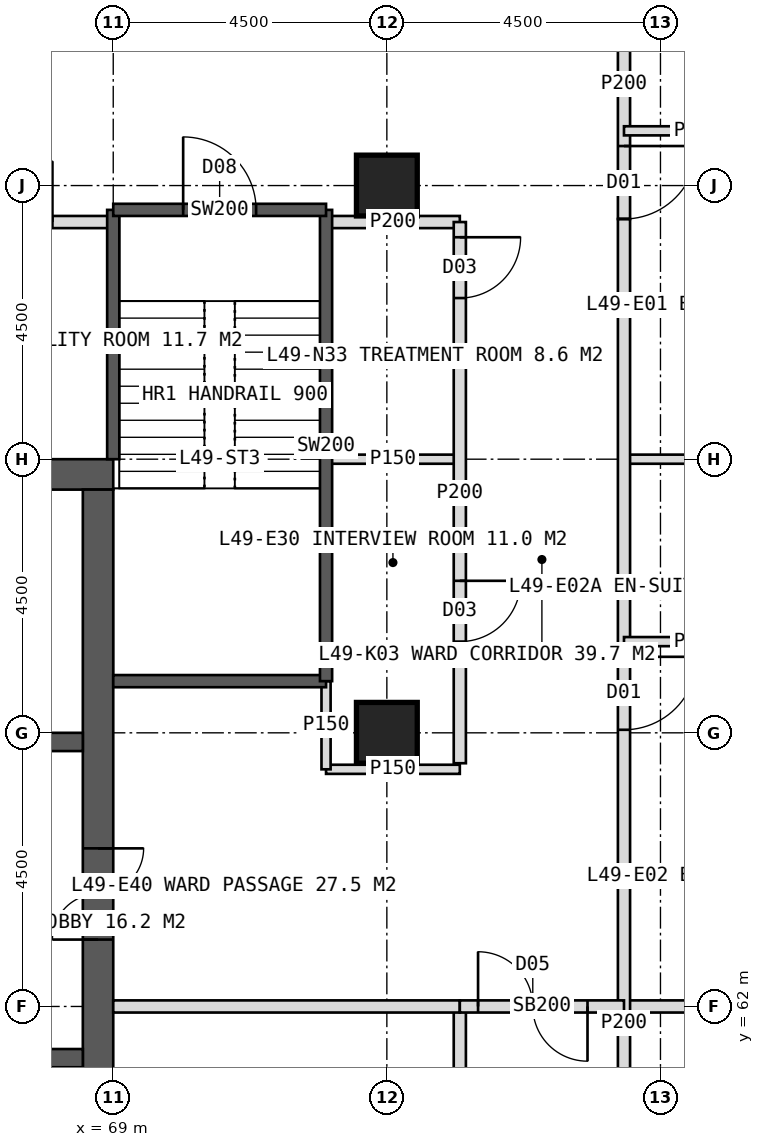
"""IFC4 building model, lengths in metres.
Left out: names, types, materials, properties, quantities, classifications, styles, units other than length and angle.
Written with IfcOpenShell. Run it as: python <this file> out.ifc"""

import sys

from ifc_helpers import new_model, si_unit, direction, frame, frame_2d, origin, origin_2d, place, context, subcontext, project, spatial, rectangle, hollow_rectangle, extrude, element, fill, save


model = new_model("IFC4")
c1 = context("Model", 3, precision=1e-05, world=origin(), true_north=direction((0.0, 1.0)))
c2 = subcontext(c1, "Body", "Model", "MODEL_VIEW")
j1 = project(units=[si_unit("LENGTHUNIT", "METRE"), si_unit("PLANEANGLEUNIT", "RADIAN")], contexts=[c1])
p1 = place(None, origin())
s1 = spatial("IfcSite", under=j1, at=p1, CompositionType="ELEMENT")
p2 = place(p1, origin())
s2 = spatial("IfcBuilding", under=s1, at=p2, CompositionType="ELEMENT")
p3 = place(p2, frame((0.0, 0.0, 205.0)))
s3 = spatial("IfcBuildingStorey", under=s2, at=p3, CompositionType="ELEMENT", Elevation=205.0)
p4 = place(p3, frame((51.0, 70.75, 0.0), z_axis=(0.0, 0.0, 1.0), x_axis=(1.0, 0.0, 0.0)))
e1 = element("IfcWall", 1, at=p4, inside=s3, PredefinedType="SHEAR", context=c2, shape_type="SweptSolid", body=[
    extrude(rectangle(XDim=18.0, YDim=0.5, at=frame_2d((9.0, 0.0))), origin(), (0.0, 0.0, 1.0), 4.0),
])
p5 = place(p4, frame((8.1, 0.0, 0.0)))
e2 = element("IfcOpeningElement", 2, at=p5, cuts=e1, PredefinedType="OPENING", context=c2, shape_type="SweptSolid", body=[
    extrude(rectangle(XDim=1.8, YDim=2.2, at=frame_2d((0.9, 1.1))), frame((0.0, 0.26, 0.0), z_axis=(0.0, -1.0, 0.0), x_axis=(1.0, 0.0, 0.0)), (0.0, 0.0, 1.0), 0.52),
])
p6 = place(p3, frame((68.75, 53.5, 0.0), z_axis=(0.0, 0.0, 1.0), x_axis=(0.0, 1.0, 0.0)))
e3 = element("IfcWall", 3, at=p6, inside=s3, PredefinedType="SHEAR", context=c2, shape_type="SweptSolid", body=[
    extrude(rectangle(XDim=17.0, YDim=0.5, at=frame_2d((8.5, 0.0))), origin(), (0.0, 0.0, 1.0), 4.0),
])
p7 = place(p6, frame((9.6, 0.0, 0.0)))
e4 = element("IfcOpeningElement", 4, at=p7, cuts=e3, PredefinedType="OPENING", context=c2, shape_type="SweptSolid", body=[
    extrude(rectangle(XDim=1.5, YDim=2.2, at=frame_2d((0.75, 1.1))), frame((0.0, 0.26, 0.0), z_axis=(0.0, -1.0, 0.0), x_axis=(1.0, 0.0, 0.0)), (0.0, 0.0, 1.0), 0.52),
])
p8 = place(p3, frame((65.2, 61.15, 0.0), z_axis=(0.0, 0.0, 1.0), x_axis=(1.0, 0.0, 0.0)))
e5 = element("IfcWall", 5, at=p8, inside=s3, PredefinedType="SHEAR", context=c2, shape_type="SweptSolid", body=[
    extrude(rectangle(XDim=3.3, YDim=0.3, at=frame_2d((1.65, 0.0))), origin(), (0.0, 0.0, 1.0), 4.0),
])
p9 = place(p8, frame((1.05, 0.0, 0.0)))
e6 = element("IfcOpeningElement", 6, at=p9, cuts=e5, PredefinedType="OPENING", context=c2, shape_type="SweptSolid", body=[
    extrude(rectangle(XDim=1.2, YDim=2.1, at=frame_2d((0.6, 1.05))), frame((0.0, 0.16, 0.0), z_axis=(0.0, -1.0, 0.0), x_axis=(1.0, 0.0, 0.0)), (0.0, 0.0, 1.0), 0.32),
])
p10 = place(p3, frame((65.2, 66.35, 0.0), z_axis=(0.0, 0.0, 1.0), x_axis=(1.0, 0.0, 0.0)))
e7 = element("IfcWall", 7, at=p10, inside=s3, PredefinedType="SHEAR", context=c2, shape_type="SweptSolid", body=[
    extrude(rectangle(XDim=3.3, YDim=0.3, at=frame_2d((1.65, 0.0))), origin(), (0.0, 0.0, 1.0), 4.0),
])
p11 = place(p10, frame((1.05, 0.0, 0.0)))
e8 = element("IfcOpeningElement", 8, at=p11, cuts=e7, PredefinedType="OPENING", context=c2, shape_type="SweptSolid", body=[
    extrude(rectangle(XDim=1.2, YDim=2.2, at=frame_2d((0.6, 1.1))), frame((0.0, 0.16, 0.0), z_axis=(0.0, -1.0, 0.0), x_axis=(1.0, 0.0, 0.0)), (0.0, 0.0, 1.0), 0.32),
])
for number, where, z_axis, x_axis in (
    (9, (73.5, 75.5, 0.0), (0.0, 0.0, 1.0), (1.0, 0.0, 0.0)),
    (10, (73.5, 66.5, 0.0), (0.0, 0.0, 1.0), (1.0, 0.0, 0.0)),
):
    element("IfcColumn", number, at=place(p3, frame(where, z_axis=z_axis, x_axis=x_axis)), inside=s3, PredefinedType="COLUMN", context=c2, shape_type="SweptSolid", body=[
        extrude(hollow_rectangle(XDim=1.0, YDim=1.0, WallThickness=0.1, at=origin_2d()), origin(), (0.0, 0.0, 1.0), 4.0),
    ])
p12 = place(p3, frame((62.25, 74.9, 0.0), z_axis=(0.0, 0.0, 1.0), x_axis=(1.0, 0.0, 0.0)))
e11 = element("IfcWall", 11, at=p12, inside=s3, PredefinedType="PARTITIONING", context=c2, shape_type="SweptSolid", body=[
    extrude(rectangle(XDim=6.75, YDim=0.2, at=frame_2d((3.375, 0.0))), origin(), (0.0, 0.0, 1.0), 3.75),
])
p13 = place(p12, frame((0.325, 0.0, 0.0)))
e12 = element("IfcOpeningElement", 12, at=p13, cuts=e11, PredefinedType="OPENING", context=c2, shape_type="SweptSolid", body=[
    extrude(rectangle(XDim=1.0, YDim=2.1, at=frame_2d((0.5, 1.05))), frame((0.0, 0.11, 0.0), z_axis=(0.0, -1.0, 0.0), x_axis=(1.0, 0.0, 0.0)), (0.0, 0.0, 1.0), 0.22),
])
p14 = place(p12, frame((4.75, 0.0, 0.0)))
e13 = element("IfcOpeningElement", 13, at=p14, cuts=e11, PredefinedType="OPENING", context=c2, shape_type="SweptSolid", body=[
    extrude(rectangle(XDim=1.0, YDim=2.1, at=frame_2d((0.5, 1.05))), frame((0.0, 0.11, 0.0), z_axis=(0.0, -1.0, 0.0), x_axis=(1.0, 0.0, 0.0)), (0.0, 0.0, 1.0), 0.22),
])
p15 = place(p3, frame((72.5, 74.9, 0.0), z_axis=(0.0, 0.0, 1.0), x_axis=(1.0, 0.0, 0.0)))
e14 = element("IfcWall", 14, at=p15, inside=s3, PredefinedType="PARTITIONING", context=c2, shape_type="SweptSolid", body=[
    extrude(rectangle(XDim=2.2, YDim=0.2, at=frame_2d((1.1, 0.0))), origin(), (0.0, 0.0, 1.0), 3.75),
])
p16 = place(p3, frame((77.4, 71.0, 0.0), z_axis=(0.0, 0.0, 1.0), x_axis=(1.0, 0.0, 0.0)))
e15 = element("IfcWall", 15, at=p16, inside=s3, PredefinedType="PARTITIONING", context=c2, shape_type="SweptSolid", body=[
    extrude(rectangle(XDim=4.95, YDim=0.15, at=frame_2d((2.475, 0.0))), origin(), (0.0, 0.0, 1.0), 3.75),
])
p17 = place(p3, frame((77.4, 62.0, 0.0), z_axis=(0.0, 0.0, 1.0), x_axis=(1.0, 0.0, 0.0)))
e16 = element("IfcWall", 16, at=p17, inside=s3, PredefinedType="SOLIDWALL", context=c2, shape_type="SweptSolid", body=[
    extrude(rectangle(XDim=4.95, YDim=0.2, at=frame_2d((2.475, 0.0))), origin(), (0.0, 0.0, 1.0), 2.95),
])
p18 = place(p3, frame((77.4, 79.4, 0.0), z_axis=(0.0, 0.0, 1.0), x_axis=(0.0, -1.0, 0.0)))
e17 = element("IfcWall", 17, at=p18, inside=s3, PredefinedType="PARTITIONING", context=c2, shape_type="SweptSolid", body=[
    extrude(rectangle(XDim=4.45, YDim=0.2, at=frame_2d((2.225, 0.0))), origin(), (0.0, 0.0, 1.0), 2.85),
])
p19 = place(p18, frame((3.25, 0.0, 0.0)))
e18 = element("IfcOpeningElement", 18, at=p19, cuts=e17, PredefinedType="OPENING", context=c2, shape_type="SweptSolid", body=[
    extrude(rectangle(XDim=1.2, YDim=2.2, at=frame_2d((0.6, 1.1))), frame((0.0, 0.11, 0.0), z_axis=(0.0, -1.0, 0.0), x_axis=(1.0, 0.0, 0.0)), (0.0, 0.0, 1.0), 0.22),
])
p20 = place(p3, frame((77.4, 74.95, 0.0), z_axis=(0.0, 0.0, 1.0), x_axis=(0.0, -1.0, 0.0)))
e19 = element("IfcWall", 19, at=p20, inside=s3, PredefinedType="PARTITIONING", context=c2, shape_type="SweptSolid", body=[
    extrude(rectangle(XDim=26.45, YDim=0.2, at=frame_2d((13.225, 0.0))), origin(), (0.0, 0.0, 1.0), 3.75),
])
p21 = place(p20, frame((7.2, 0.0, 0.0)))
e20 = element("IfcOpeningElement", 20, at=p21, cuts=e19, PredefinedType="OPENING", context=c2, shape_type="SweptSolid", body=[
    extrude(rectangle(XDim=1.2, YDim=2.2, at=frame_2d((0.6, 1.1))), frame((0.0, 0.11, 0.0), z_axis=(0.0, -1.0, 0.0), x_axis=(1.0, 0.0, 0.0)), (0.0, 0.0, 1.0), 0.22),
])
p22 = place(p20, frame((16.2, 0.0, 0.0)))
e21 = element("IfcOpeningElement", 21, at=p22, cuts=e19, PredefinedType="OPENING", context=c2, shape_type="SweptSolid", body=[
    extrude(rectangle(XDim=1.2, YDim=2.2, at=frame_2d((0.6, 1.1))), frame((0.0, 0.11, 0.0), z_axis=(0.0, -1.0, 0.0), x_axis=(1.0, 0.0, 0.0)), (0.0, 0.0, 1.0), 0.22),
])
p23 = place(p20, frame((25.2, 0.0, 0.0)))
e22 = element("IfcOpeningElement", 22, at=p23, cuts=e19, PredefinedType="OPENING", context=c2, shape_type="SweptSolid", body=[
    extrude(rectangle(XDim=1.2, YDim=2.2, at=frame_2d((0.6, 1.1))), frame((0.0, 0.11, 0.0), z_axis=(0.0, -1.0, 0.0), x_axis=(1.0, 0.0, 0.0)), (0.0, 0.0, 1.0), 0.22),
])
for number, where, z_axis, x_axis in (
    (23, (77.4, 76.4, 0.0), (0.0, 0.0, 1.0), (1.0, 0.0, 0.0)),
    (24, (77.4, 68.0, 0.0), (0.0, 0.0, 1.0), (1.0, 0.0, 0.0)),
):
    element("IfcWall", number, at=place(p3, frame(where, z_axis=z_axis, x_axis=x_axis)), inside=s3, PredefinedType="PARTITIONING", context=c2, shape_type="SweptSolid", body=[
        extrude(rectangle(XDim=2.4, YDim=0.15, at=frame_2d((1.2, 0.0))), origin(), (0.0, 0.0, 1.0), 3.75),
    ])
p24 = place(p3, frame((72.5, 71.0, 0.0), z_axis=(0.0, 0.0, 1.0), x_axis=(1.0, 0.0, 0.0)))
e25 = element("IfcWall", 25, at=p24, inside=s3, PredefinedType="PARTITIONING", context=c2, shape_type="SweptSolid", body=[
    extrude(rectangle(XDim=2.2, YDim=0.15, at=frame_2d((1.1, 0.0))), origin(), (0.0, 0.0, 1.0), 3.75),
])
p25 = place(p3, frame((74.7, 74.9, 0.0), z_axis=(0.0, 0.0, 1.0), x_axis=(0.0, -1.0, 0.0)))
e26 = element("IfcWall", 26, at=p25, inside=s3, PredefinedType="PARTITIONING", context=c2, shape_type="SweptSolid", body=[
    extrude(rectangle(XDim=8.9, YDim=0.2, at=frame_2d((4.45, 0.0))), origin(), (0.0, 0.0, 1.0), 3.75),
])
p26 = place(p25, frame((0.25, 0.0, 0.0)))
e27 = element("IfcOpeningElement", 27, at=p26, cuts=e26, PredefinedType="OPENING", context=c2, shape_type="SweptSolid", body=[
    extrude(rectangle(XDim=1.0, YDim=2.1, at=frame_2d((0.5, 1.05))), frame((0.0, 0.11, 0.0), z_axis=(0.0, -1.0, 0.0), x_axis=(1.0, 0.0, 0.0)), (0.0, 0.0, 1.0), 0.22),
])
p27 = place(p25, frame((5.9, 0.0, 0.0)))
e28 = element("IfcOpeningElement", 28, at=p27, cuts=e26, PredefinedType="OPENING", context=c2, shape_type="SweptSolid", body=[
    extrude(rectangle(XDim=1.0, YDim=2.1, at=frame_2d((0.5, 1.05))), frame((0.0, 0.11, 0.0), z_axis=(0.0, -1.0, 0.0), x_axis=(1.0, 0.0, 0.0)), (0.0, 0.0, 1.0), 0.22),
])
p28 = place(p3, frame((74.7, 62.0, 0.0), z_axis=(0.0, 0.0, 1.0), x_axis=(0.0, -1.0, 0.0)))
e29 = element("IfcWall", 29, at=p28, inside=s3, PredefinedType="PARTITIONING", context=c2, shape_type="SweptSolid", body=[
    extrude(rectangle(XDim=14.7, YDim=0.2, at=frame_2d((7.35, 0.0))), origin(), (0.0, 0.0, 1.0), 3.75),
])
p29 = place(p28, frame((1.45, 0.0, 0.0)))
e30 = element("IfcOpeningElement", 30, at=p29, cuts=e29, PredefinedType="OPENING", context=c2, shape_type="SweptSolid", body=[
    extrude(rectangle(XDim=1.0, YDim=2.1, at=frame_2d((0.5, 1.05))), frame((0.0, 0.11, 0.0), z_axis=(0.0, -1.0, 0.0), x_axis=(1.0, 0.0, 0.0)), (0.0, 0.0, 1.0), 0.22),
])
p30 = place(p28, frame((11.35, 0.0, 0.0)))
e31 = element("IfcOpeningElement", 31, at=p30, cuts=e29, PredefinedType="OPENING", context=c2, shape_type="SweptSolid", body=[
    extrude(rectangle(XDim=1.0, YDim=2.1, at=frame_2d((0.5, 1.05))), frame((0.0, 0.11, 0.0), z_axis=(0.0, -1.0, 0.0), x_axis=(1.0, 0.0, 0.0)), (0.0, 0.0, 1.0), 0.22),
])
p31 = place(p3, frame((72.5, 65.9, 0.0), z_axis=(0.0, 0.0, 1.0), x_axis=(1.0, 0.0, 0.0)))
e32 = element("IfcWall", 32, at=p31, inside=s3, PredefinedType="PARTITIONING", context=c2, shape_type="SweptSolid", body=[
    extrude(rectangle(XDim=2.2, YDim=0.15, at=frame_2d((1.1, 0.0))), origin(), (0.0, 0.0, 1.0), 3.75),
])
p32 = place(p3, frame((69.0, 62.0, 0.0), z_axis=(0.0, 0.0, 1.0), x_axis=(1.0, 0.0, 0.0)))
e33 = element("IfcWall", 33, at=p32, inside=s3, PredefinedType="SOLIDWALL", context=c2, shape_type="SweptSolid", body=[
    extrude(rectangle(XDim=5.7, YDim=0.2, at=frame_2d((2.85, 0.0))), origin(), (0.0, 0.0, 1.0), 2.95),
])
p33 = place(p3, frame((74.7, 62.0, 0.0), z_axis=(0.0, 0.0, 1.0), x_axis=(1.0, 0.0, 0.0)))
e34 = element("IfcWall", 34, at=p33, inside=s3, PredefinedType="SOLIDWALL", context=c2, shape_type="SweptSolid", body=[
    extrude(rectangle(XDim=2.7, YDim=0.2, at=frame_2d((1.35, 0.0))), origin(), (0.0, 0.0, 1.0), 2.95),
])
p34 = place(p33, frame((0.3, 0.0, 0.0)))
e35 = element("IfcOpeningElement", 35, at=p34, cuts=e34, PredefinedType="OPENING", context=c2, shape_type="SweptSolid", body=[
    extrude(rectangle(XDim=1.8, YDim=2.2, at=frame_2d((0.9, 1.1))), frame((0.0, 0.11, 0.0), z_axis=(0.0, -1.0, 0.0), x_axis=(1.0, 0.0, 0.0)), (0.0, 0.0, 1.0), 0.22),
])
p35 = place(p3, frame((72.5, 65.9, 0.0), z_axis=(0.0, 0.0, 1.0), x_axis=(0.0, 1.0, 0.0)))
e36 = element("IfcWall", 36, at=p35, inside=s3, PredefinedType="PARTITIONING", context=c2, shape_type="SweptSolid", body=[
    extrude(rectangle(XDim=1.45, YDim=0.15, at=frame_2d((0.725, 0.0))), origin(), (0.0, 0.0, 1.0), 3.75),
])
p36 = place(p3, frame((69.0, 71.0, 0.0), z_axis=(0.0, 0.0, 1.0), x_axis=(0.0, 1.0, 0.0)))
e37 = element("IfcWall", 37, at=p36, inside=s3, PredefinedType="SOLIDWALL", context=c2, shape_type="SweptSolid", body=[
    extrude(rectangle(XDim=4.1, YDim=0.2, at=frame_2d((2.05, 0.0))), origin(), (0.0, 0.0, 1.0), 3.75),
])
p37 = place(p3, frame((69.0, 67.35, 0.0), z_axis=(0.0, 0.0, 1.0), x_axis=(1.0, 0.0, 0.0)))
e38 = element("IfcWall", 38, at=p37, inside=s3, PredefinedType="SOLIDWALL", context=c2, shape_type="SweptSolid", body=[
    extrude(rectangle(XDim=3.5, YDim=0.2, at=frame_2d((1.75, 0.0))), origin(), (0.0, 0.0, 1.0), 3.75),
])
p38 = place(p3, frame((72.5, 67.35, 0.0), z_axis=(0.0, 0.0, 1.0), x_axis=(0.0, 1.0, 0.0)))
e39 = element("IfcWall", 39, at=p38, inside=s3, PredefinedType="SOLIDWALL", context=c2, shape_type="SweptSolid", body=[
    extrude(rectangle(XDim=7.75, YDim=0.2, at=frame_2d((3.875, 0.0))), origin(), (0.0, 0.0, 1.0), 3.75),
])
p39 = place(p3, frame((69.0, 75.1, 0.0), z_axis=(0.0, 0.0, 1.0), x_axis=(1.0, 0.0, 0.0)))
e40 = element("IfcWall", 40, at=p39, inside=s3, PredefinedType="SOLIDWALL", context=c2, shape_type="SweptSolid", body=[
    extrude(rectangle(XDim=3.5, YDim=0.2, at=frame_2d((1.75, 0.0))), origin(), (0.0, 0.0, 1.0), 3.75),
])
p40 = place(p39, frame((1.15, 0.0, 0.0)))
e41 = element("IfcOpeningElement", 41, at=p40, cuts=e40, PredefinedType="OPENING", context=c2, shape_type="SweptSolid", body=[
    extrude(rectangle(XDim=1.2, YDim=2.1, at=frame_2d((0.6, 1.05))), frame((0.0, 0.11, 0.0), z_axis=(0.0, -1.0, 0.0), x_axis=(1.0, 0.0, 0.0)), (0.0, 0.0, 1.0), 0.22),
])
p41 = place(p26, origin())
e42 = element("IfcDoor", 42, at=p41, inside=s3, OperationType="SINGLE_SWING_LEFT", PredefinedType="DOOR", context=c2, shape_type="SweptSolid", body=[
    extrude(rectangle(XDim=1.0, YDim=2.1, at=frame_2d((0.5, 1.05))), frame((0.0, 0.025, 0.0), z_axis=(0.0, -1.0, 0.0), x_axis=(1.0, 0.0, 0.0)), (0.0, 0.0, 1.0), 0.05),
])
fill(e27, e42)
p42 = place(p19, origin())
e43 = element("IfcDoor", 43, at=p42, inside=s3, OperationType="SINGLE_SWING_LEFT", PredefinedType="DOOR", context=c2, shape_type="SweptSolid", body=[
    extrude(rectangle(XDim=1.2, YDim=2.2, at=frame_2d((0.6, 1.1))), frame((0.0, 0.025, 0.0), z_axis=(0.0, -1.0, 0.0), x_axis=(1.0, 0.0, 0.0)), (0.0, 0.0, 1.0), 0.05),
])
fill(e18, e43)
p43 = place(p21, origin())
e44 = element("IfcDoor", 44, at=p43, inside=s3, OperationType="SINGLE_SWING_LEFT", PredefinedType="DOOR", context=c2, shape_type="SweptSolid", body=[
    extrude(rectangle(XDim=1.2, YDim=2.2, at=frame_2d((0.6, 1.1))), frame((0.0, 0.025, 0.0), z_axis=(0.0, -1.0, 0.0), x_axis=(1.0, 0.0, 0.0)), (0.0, 0.0, 1.0), 0.05),
])
fill(e20, e44)
p44 = place(p27, origin())
e45 = element("IfcDoor", 45, at=p44, inside=s3, OperationType="SINGLE_SWING_LEFT", PredefinedType="DOOR", context=c2, shape_type="SweptSolid", body=[
    extrude(rectangle(XDim=1.0, YDim=2.1, at=frame_2d((0.5, 1.05))), frame((0.0, 0.025, 0.0), z_axis=(0.0, -1.0, 0.0), x_axis=(1.0, 0.0, 0.0)), (0.0, 0.0, 1.0), 0.05),
])
fill(e28, e45)
p45 = place(p34, origin())
e46 = element("IfcDoor", 46, at=p45, inside=s3, OperationType="DOUBLE_DOOR_DOUBLE_SWING", PredefinedType="DOOR", context=c2, shape_type="SweptSolid", body=[
    extrude(rectangle(XDim=1.8, YDim=2.2, at=frame_2d((0.9, 1.1))), frame((0.0, 0.025, 0.0), z_axis=(0.0, -1.0, 0.0), x_axis=(1.0, 0.0, 0.0)), (0.0, 0.0, 1.0), 0.05),
])
fill(e35, e46)
p46 = place(p7, origin())
e47 = element("IfcDoor", 47, at=p46, inside=s3, OperationType="DOUBLE_DOOR_SINGLE_SWING", PredefinedType="DOOR", context=c2, shape_type="SweptSolid", body=[
    extrude(rectangle(XDim=1.5, YDim=2.2, at=frame_2d((0.75, 1.1))), frame((0.0, 0.025, 0.0), z_axis=(0.0, -1.0, 0.0), x_axis=(1.0, 0.0, 0.0)), (0.0, 0.0, 1.0), 0.05),
])
fill(e4, e47)
p47 = place(p40, origin())
e48 = element("IfcDoor", 48, at=p47, inside=s3, OperationType="SINGLE_SWING_LEFT", PredefinedType="DOOR", context=c2, shape_type="SweptSolid", body=[
    extrude(rectangle(XDim=1.2, YDim=2.1, at=frame_2d((0.6, 1.05))), frame((0.0, 0.025, 0.0), z_axis=(0.0, -1.0, 0.0), x_axis=(1.0, 0.0, 0.0)), (0.0, 0.0, 1.0), 0.05),
])
fill(e41, e48)
save(model, sys.argv[1])
